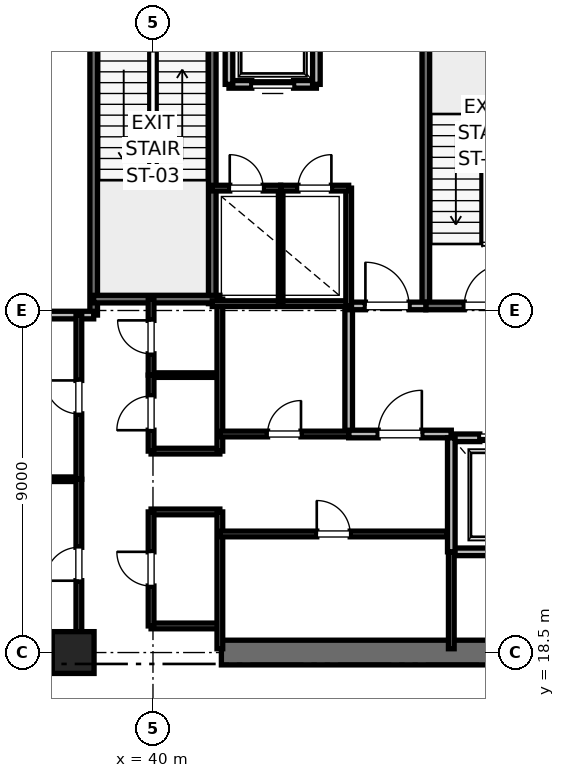
"""IFC4 building model, lengths in metres.
Left out: names, types, materials, properties, quantities, classifications, styles, units other than length and angle.
Written with IfcOpenShell. Run it as: python <this file> out.ifc"""

import sys

from ifc_helpers import new_model, si_unit, direction, frame, frame_2d, origin, origin_2d, place, context, subcontext, project, spatial, rectangle, extrude, element, fill, save


model = new_model("IFC4")
c1 = context("Model", 3, precision=1e-05, world=origin(), true_north=direction((0.0, 1.0)))
c2 = subcontext(c1, "Body", "Model", "MODEL_VIEW")
j1 = project(units=[si_unit("LENGTHUNIT", "METRE"), si_unit("PLANEANGLEUNIT", "RADIAN")], contexts=[c1])
p1 = place(None, origin())
s1 = spatial("IfcSite", under=j1, at=p1, CompositionType="ELEMENT")
p2 = place(p1, origin())
s2 = spatial("IfcBuilding", under=s1, at=p2, CompositionType="ELEMENT")
p3 = place(p2, frame((0.0, 0.0, -4.5)))
s3 = spatial("IfcBuildingStorey", under=s2, at=p3, CompositionType="ELEMENT", Elevation=-4.5)
p4 = place(p3, frame((37.9, 18.5, 0.0), z_axis=(0.0, 0.0, 1.0), x_axis=(1.0, 0.0, 0.0)))
e1 = element("IfcColumn", 1, at=p4, inside=s3, PredefinedType="PILASTER", context=c2, shape_type="SweptSolid", body=[
    extrude(rectangle(XDim=1.1, YDim=1.1, at=origin_2d()), origin(), (0.0, 0.0, 1.0), 4.5),
])
for number, where, z_axis, x_axis in (
    (2, (29.0, 18.5, 0.0), (0.0, 0.0, 1.0), (1.0, 0.0, 0.0)),
    (3, (41.8, 18.5, 0.0), (0.0, 0.0, 1.0), (1.0, 0.0, 0.0)),
):
    element("IfcWall", number, at=place(p3, frame(where, z_axis=z_axis, x_axis=x_axis)), inside=s3, PredefinedType="SHEAR", context=c2, shape_type="SweptSolid", body=[
        extrude(rectangle(XDim=9.2, YDim=0.65, at=frame_2d((4.6, 0.0))), origin(), (0.0, 0.0, 1.0), 4.22),
    ])
p5 = place(p3, frame((47.18, 27.62, 0.0), z_axis=(0.0, 0.0, 1.0), x_axis=(0.0, 1.0, 0.0)))
e4 = element("IfcWall", 4, at=p5, inside=s3, PredefinedType="SOLIDWALL", context=c2, shape_type="SweptSolid", body=[
    extrude(rectangle(XDim=8.18, YDim=0.2, at=frame_2d((4.09, 0.0))), origin(), (0.0, 0.0, 1.0), 4.22),
])
p6 = place(p3, frame((47.18, 27.62, 0.0), z_axis=(0.0, 0.0, 1.0), x_axis=(1.0, 0.0, 0.0)))
e5 = element("IfcWall", 5, at=p6, inside=s3, PredefinedType="SOLIDWALL", context=c2, shape_type="SweptSolid", body=[
    extrude(rectangle(XDim=3.12, YDim=0.2, at=frame_2d((1.56, 0.0))), origin(), (0.0, 0.0, 1.0), 4.22),
])
p7 = place(p6, frame((1.01, 0.0, 0.0)))
e6 = element("IfcOpeningElement", 6, at=p7, cuts=e5, PredefinedType="OPENING", context=c2, shape_type="SweptSolid", body=[
    extrude(rectangle(XDim=1.1, YDim=2.15, at=frame_2d((0.55, 1.075))), frame((0.0, 0.1, 0.0), z_axis=(0.0, -1.0, 0.0), x_axis=(1.0, 0.0, 0.0)), (0.0, 0.0, 1.0), 0.2),
])
p8 = place(p3, frame((38.44, 27.38, 0.0), z_axis=(0.0, 0.0, 1.0), x_axis=(0.0, 1.0, 0.0)))
e7 = element("IfcWall", 7, at=p8, inside=s3, PredefinedType="SOLIDWALL", context=c2, shape_type="SweptSolid", body=[
    extrude(rectangle(XDim=8.87, YDim=0.2, at=frame_2d((4.435, 0.0))), origin(), (0.0, 0.0, 1.0), 4.22),
])
p9 = place(p3, frame((41.56, 27.68, 0.0), z_axis=(0.0, 0.0, 1.0), x_axis=(0.0, 1.0, 0.0)))
e8 = element("IfcWall", 8, at=p9, inside=s3, PredefinedType="SOLIDWALL", context=c2, shape_type="SweptSolid", body=[
    extrude(rectangle(XDim=8.57, YDim=0.2, at=frame_2d((4.285, 0.0))), origin(), (0.0, 0.0, 1.0), 4.22),
])
p10 = place(p3, frame((38.44, 27.8, 0.0), z_axis=(0.0, 0.0, 1.0), x_axis=(1.0, 0.0, 0.0)))
e9 = element("IfcWall", 9, at=p10, inside=s3, PredefinedType="SOLIDWALL", context=c2, shape_type="SweptSolid", body=[
    extrude(rectangle(XDim=3.32, YDim=0.2, at=frame_2d((1.66, 0.0))), origin(), (0.0, 0.0, 1.0), 4.22),
])
p11 = place(p3, frame((32.82, 27.38, 0.0), z_axis=(0.0, 0.0, 1.0), x_axis=(1.0, 0.0, 0.0)))
e10 = element("IfcWall", 10, at=p11, inside=s3, PredefinedType="PARTITIONING", context=c2, shape_type="SweptSolid", body=[
    extrude(rectangle(XDim=5.62, YDim=0.2, at=frame_2d((2.81, 0.0))), origin(), (0.0, 0.0, 1.0), 4.22),
])
p12 = place(p3, frame((45.15, 24.25, 0.0), z_axis=(0.0, 0.0, 1.0), x_axis=(0.0, 1.0, 0.0)))
e11 = element("IfcWall", 11, at=p12, inside=s3, PredefinedType="PARTITIONING", context=c2, shape_type="SweptSolid", body=[
    extrude(rectangle(XDim=3.37, YDim=0.2, at=frame_2d((1.685, 0.0))), origin(), (0.0, 0.0, 1.0), 4.22),
])
p13 = place(p3, frame((45.15, 24.25, 0.0), z_axis=(0.0, 0.0, 1.0), x_axis=(1.0, 0.0, 0.0)))
e12 = element("IfcWall", 12, at=p13, inside=s3, PredefinedType="PARTITIONING", context=c2, shape_type="SweptSolid", body=[
    extrude(rectangle(XDim=2.7, YDim=0.2, at=frame_2d((1.35, 0.0))), origin(), (0.0, 0.0, 1.0), 4.22),
])
p14 = place(p13, frame((0.775, 0.0, 0.0)))
e13 = element("IfcOpeningElement", 13, at=p14, cuts=e12, PredefinedType="OPENING", context=c2, shape_type="SweptSolid", body=[
    extrude(rectangle(XDim=1.15, YDim=2.2, at=frame_2d((0.575, 1.1))), frame((0.0, 0.1, 0.0), z_axis=(0.0, -1.0, 0.0), x_axis=(1.0, 0.0, 0.0)), (0.0, 0.0, 1.0), 0.2),
])
p15 = place(p3, frame((45.15, 27.62, 0.0), z_axis=(0.0, 0.0, 1.0), x_axis=(1.0, 0.0, 0.0)))
e14 = element("IfcWall", 14, at=p15, inside=s3, PredefinedType="PARTITIONING", context=c2, shape_type="SweptSolid", body=[
    extrude(rectangle(XDim=2.03, YDim=0.2, at=frame_2d((1.015, 0.0))), origin(), (0.0, 0.0, 1.0), 4.22),
])
p16 = place(p15, frame((0.44, 0.0, 0.0)))
e15 = element("IfcOpeningElement", 15, at=p16, cuts=e14, PredefinedType="OPENING", context=c2, shape_type="SweptSolid", body=[
    extrude(rectangle(XDim=1.15, YDim=2.2, at=frame_2d((0.575, 1.1))), frame((0.0, 0.1, 0.0), z_axis=(0.0, -1.0, 0.0), x_axis=(1.0, 0.0, 0.0)), (0.0, 0.0, 1.0), 0.2),
])
p17 = place(p3, frame((47.85, 21.15, 0.0), z_axis=(0.0, 0.0, 1.0), x_axis=(1.0, 0.0, 0.0)))
e16 = element("IfcWall", 16, at=p17, inside=s3, PredefinedType="SOLIDWALL", context=c2, shape_type="SweptSolid", body=[
    extrude(rectangle(XDim=2.6, YDim=0.2, at=frame_2d((1.3, 0.0))), origin(), (0.0, 0.0, 1.0), 4.22),
])
p18 = place(p3, frame((50.45, 24.15, 0.0), z_axis=(0.0, 0.0, 1.0), x_axis=(-1.0, 0.0, 0.0)))
e17 = element("IfcWall", 17, at=p18, inside=s3, PredefinedType="SOLIDWALL", context=c2, shape_type="SweptSolid", body=[
    extrude(rectangle(XDim=2.6, YDim=0.2, at=frame_2d((1.3, 0.0))), origin(), (0.0, 0.0, 1.0), 3.0),
])
p19 = place(p18, frame((0.75, 0.0, 0.0)))
e18 = element("IfcOpeningElement", 18, at=p19, cuts=e17, PredefinedType="OPENING", context=c2, shape_type="SweptSolid", body=[
    extrude(rectangle(XDim=1.1, YDim=2.2, at=frame_2d((0.55, 1.1))), frame((0.0, 0.1, 0.0), z_axis=(0.0, -1.0, 0.0), x_axis=(1.0, 0.0, 0.0)), (0.0, 0.0, 1.0), 0.2),
])
p20 = place(p3, frame((47.85, 24.15, 0.0), z_axis=(0.0, 0.0, 1.0), x_axis=(0.0, -1.0, 0.0)))
e19 = element("IfcWall", 19, at=p20, inside=s3, PredefinedType="SOLIDWALL", context=c2, shape_type="SweptSolid", body=[
    extrude(rectangle(XDim=3.0, YDim=0.2, at=frame_2d((1.5, 0.0))), origin(), (0.0, 0.0, 1.0), 4.22),
])
p21 = place(p3, frame((42.0, 33.45, 0.0), z_axis=(0.0, 0.0, 1.0), x_axis=(1.0, 0.0, 0.0)))
e20 = element("IfcWall", 20, at=p21, inside=s3, PredefinedType="SOLIDWALL", context=c2, shape_type="SweptSolid", body=[
    extrude(rectangle(XDim=2.3, YDim=0.2, at=frame_2d((1.15, 0.0))), origin(), (0.0, 0.0, 1.0), 4.22),
])
p22 = place(p21, frame((0.6, 0.0, 0.0)))
e21 = element("IfcOpeningElement", 21, at=p22, cuts=e20, PredefinedType="OPENING", context=c2, shape_type="SweptSolid", body=[
    extrude(rectangle(XDim=1.1, YDim=2.2, at=frame_2d((0.55, 1.1))), frame((0.0, 0.1, 0.0), z_axis=(0.0, -1.0, 0.0), x_axis=(1.0, 0.0, 0.0)), (0.0, 0.0, 1.0), 0.2),
])
for number, where, z_axis, x_axis in (
    (22, (42.0, 36.05, 0.0), (0.0, 0.0, 1.0), (0.0, -1.0, 0.0)),
    (23, (44.3, 33.45, 0.0), (0.0, 0.0, 1.0), (0.0, 1.0, 0.0)),
):
    element("IfcWall", number, at=place(p3, frame(where, z_axis=z_axis, x_axis=x_axis)), inside=s3, PredefinedType="SOLIDWALL", context=c2, shape_type="SweptSolid", body=[
        extrude(rectangle(XDim=2.6, YDim=0.2, at=frame_2d((1.3, 0.0))), origin(), (0.0, 0.0, 1.0), 3.0),
    ])
for number, where, z_axis, x_axis in (
    (24, (39.95, 19.2, 0.0), (0.0, 0.0, 1.0), (1.0, 0.0, 0.0)),
    (25, (39.95, 22.2, 0.0), (0.0, 0.0, 1.0), (1.0, 0.0, 0.0)),
    (26, (39.95, 23.8, 0.0), (0.0, 0.0, 1.0), (1.0, 0.0, 0.0)),
):
    element("IfcWall", number, at=place(p3, frame(where, z_axis=z_axis, x_axis=x_axis)), inside=s3, PredefinedType="PARTITIONING", context=c2, shape_type="SweptSolid", body=[
        extrude(rectangle(XDim=1.81, YDim=0.15, at=frame_2d((0.905, 0.0))), origin(), (0.0, 0.0, 1.0), 2.85),
    ])
p23 = place(p3, frame((39.95, 25.8, 0.0), z_axis=(0.0, 0.0, 1.0), x_axis=(1.0, 0.0, 0.0)))
e27 = element("IfcWall", 27, at=p23, inside=s3, PredefinedType="PARTITIONING", context=c2, shape_type="SweptSolid", body=[
    extrude(rectangle(XDim=1.81, YDim=0.12, at=frame_2d((0.905, 0.0))), origin(), (0.0, 0.0, 1.0), 2.85),
])
p24 = place(p3, frame((41.76, 18.6, 0.0), z_axis=(0.0, 0.0, 1.0), x_axis=(0.0, 1.0, 0.0)))
e28 = element("IfcWall", 28, at=p24, inside=s3, PredefinedType="PARTITIONING", context=c2, shape_type="SweptSolid", body=[
    extrude(rectangle(XDim=3.6, YDim=0.15, at=frame_2d((1.8, 0.0))), origin(), (0.0, 0.0, 1.0), 2.85),
])
p25 = place(p3, frame((41.76, 23.8, 0.0), z_axis=(0.0, 0.0, 1.0), x_axis=(0.0, 1.0, 0.0)))
e29 = element("IfcWall", 29, at=p25, inside=s3, PredefinedType="PARTITIONING", context=c2, shape_type="SweptSolid", body=[
    extrude(rectangle(XDim=4.0, YDim=0.15, at=frame_2d((2.0, 0.0))), origin(), (0.0, 0.0, 1.0), 2.85),
])
p26 = place(p3, frame((39.95, 19.2, 0.0), z_axis=(0.0, 0.0, 1.0), x_axis=(0.0, 1.0, 0.0)))
e30 = element("IfcWall", 30, at=p26, inside=s3, PredefinedType="PARTITIONING", context=c2, shape_type="SweptSolid", body=[
    extrude(rectangle(XDim=3.0, YDim=0.15, at=frame_2d((1.5, 0.0))), origin(), (0.0, 0.0, 1.0), 2.85),
])
p27 = place(p26, frame((1.05, 0.0, 0.0)))
e31 = element("IfcOpeningElement", 31, at=p27, cuts=e30, PredefinedType="OPENING", context=c2, shape_type="SweptSolid", body=[
    extrude(rectangle(XDim=0.9, YDim=2.1, at=frame_2d((0.45, 1.05))), frame((0.0, 0.075, 0.0), z_axis=(0.0, -1.0, 0.0), x_axis=(1.0, 0.0, 0.0)), (0.0, 0.0, 1.0), 0.15),
])
p28 = place(p3, frame((39.95, 23.8, 0.0), z_axis=(0.0, 0.0, 1.0), x_axis=(0.0, 1.0, 0.0)))
e32 = element("IfcWall", 32, at=p28, inside=s3, PredefinedType="PARTITIONING", context=c2, shape_type="SweptSolid", body=[
    extrude(rectangle(XDim=2.0, YDim=0.15, at=frame_2d((1.0, 0.0))), origin(), (0.0, 0.0, 1.0), 2.85),
])
p29 = place(p28, frame((0.55, 0.0, 0.0)))
e33 = element("IfcOpeningElement", 33, at=p29, cuts=e32, PredefinedType="OPENING", context=c2, shape_type="SweptSolid", body=[
    extrude(rectangle(XDim=0.9, YDim=2.1, at=frame_2d((0.45, 1.05))), frame((0.0, 0.075, 0.0), z_axis=(0.0, -1.0, 0.0), x_axis=(1.0, 0.0, 0.0)), (0.0, 0.0, 1.0), 0.15),
])
p30 = place(p3, frame((39.95, 25.8, 0.0), z_axis=(0.0, 0.0, 1.0), x_axis=(0.0, 1.0, 0.0)))
e34 = element("IfcWall", 34, at=p30, inside=s3, PredefinedType="PARTITIONING", context=c2, shape_type="SweptSolid", body=[
    extrude(rectangle(XDim=2.0, YDim=0.15, at=frame_2d((1.0, 0.0))), origin(), (0.0, 0.0, 1.0), 2.85),
])
p31 = place(p30, frame((0.56, 0.0, 0.0)))
e35 = element("IfcOpeningElement", 35, at=p31, cuts=e34, PredefinedType="OPENING", context=c2, shape_type="SweptSolid", body=[
    extrude(rectangle(XDim=0.88, YDim=2.1, at=frame_2d((0.44, 1.05))), frame((0.0, 0.075, 0.0), z_axis=(0.0, -1.0, 0.0), x_axis=(1.0, 0.0, 0.0)), (0.0, 0.0, 1.0), 0.15),
])
p32 = place(p3, frame((32.82, 23.06, 0.0), z_axis=(0.0, 0.0, 1.0), x_axis=(1.0, 0.0, 0.0)))
e36 = element("IfcWall", 36, at=p32, inside=s3, PredefinedType="PARTITIONING", context=c2, shape_type="SweptSolid", body=[
    extrude(rectangle(XDim=5.23, YDim=0.12, at=frame_2d((2.615, 0.0))), origin(), (0.0, 0.0, 1.0), 2.85),
])
p33 = place(p3, frame((38.05, 18.6, 0.0), z_axis=(0.0, 0.0, 1.0), x_axis=(0.0, 1.0, 0.0)))
e37 = element("IfcWall", 37, at=p33, inside=s3, PredefinedType="PARTITIONING", context=c2, shape_type="SweptSolid", body=[
    extrude(rectangle(XDim=4.46, YDim=0.15, at=frame_2d((2.23, 0.0))), origin(), (0.0, 0.0, 1.0), 2.85),
])
p34 = place(p33, frame((1.79, 0.0, 0.0)))
e38 = element("IfcOpeningElement", 38, at=p34, cuts=e37, PredefinedType="OPENING", context=c2, shape_type="SweptSolid", body=[
    extrude(rectangle(XDim=0.88, YDim=2.1, at=frame_2d((0.44, 1.05))), frame((0.0, 0.075, 0.0), z_axis=(0.0, -1.0, 0.0), x_axis=(1.0, 0.0, 0.0)), (0.0, 0.0, 1.0), 0.15),
])
p35 = place(p3, frame((38.05, 23.06, 0.0), z_axis=(0.0, 0.0, 1.0), x_axis=(0.0, 1.0, 0.0)))
e39 = element("IfcWall", 39, at=p35, inside=s3, PredefinedType="PARTITIONING", context=c2, shape_type="SweptSolid", body=[
    extrude(rectangle(XDim=4.32, YDim=0.15, at=frame_2d((2.16, 0.0))), origin(), (0.0, 0.0, 1.0), 2.85),
])
p36 = place(p35, frame((1.72, 0.0, 0.0)))
e40 = element("IfcOpeningElement", 40, at=p36, cuts=e39, PredefinedType="OPENING", context=c2, shape_type="SweptSolid", body=[
    extrude(rectangle(XDim=0.88, YDim=2.1, at=frame_2d((0.44, 1.05))), frame((0.0, 0.075, 0.0), z_axis=(0.0, -1.0, 0.0), x_axis=(1.0, 0.0, 0.0)), (0.0, 0.0, 1.0), 0.15),
])
p37 = place(p3, frame((41.56, 27.68, 0.0), z_axis=(0.0, 0.0, 1.0), x_axis=(1.0, 0.0, 0.0)))
e41 = element("IfcWall", 41, at=p37, inside=s3, PredefinedType="PARTITIONING", context=c2, shape_type="SweptSolid", body=[
    extrude(rectangle(XDim=3.59, YDim=0.15, at=frame_2d((1.795, 0.0))), origin(), (0.0, 0.0, 1.0), 2.85),
])
p38 = place(p3, frame((47.85, 18.6, 0.0), z_axis=(0.0, 0.0, 1.0), x_axis=(0.0, 1.0, 0.0)))
e42 = element("IfcWall", 42, at=p38, inside=s3, PredefinedType="PARTITIONING", context=c2, shape_type="SweptSolid", body=[
    extrude(rectangle(XDim=2.54, YDim=0.15, at=frame_2d((1.27, 0.0))), origin(), (0.0, 0.0, 1.0), 2.85),
])
p39 = place(p3, frame((41.76, 21.62, 0.0), z_axis=(0.0, 0.0, 1.0), x_axis=(1.0, 0.0, 0.0)))
e43 = element("IfcWall", 43, at=p39, inside=s3, PredefinedType="PARTITIONING", context=c2, shape_type="SweptSolid", body=[
    extrude(rectangle(XDim=5.98, YDim=0.15, at=frame_2d((2.99, 0.0))), origin(), (0.0, 0.0, 1.0), 2.85),
])
p40 = place(p39, frame((2.55, 0.0, 0.0)))
e44 = element("IfcOpeningElement", 44, at=p40, cuts=e43, PredefinedType="OPENING", context=c2, shape_type="SweptSolid", body=[
    extrude(rectangle(XDim=0.88, YDim=2.1, at=frame_2d((0.44, 1.05))), frame((0.0, 0.075, 0.0), z_axis=(0.0, -1.0, 0.0), x_axis=(1.0, 0.0, 0.0)), (0.0, 0.0, 1.0), 0.15),
])
p41 = place(p3, frame((41.76, 24.25, 0.0), z_axis=(0.0, 0.0, 1.0), x_axis=(1.0, 0.0, 0.0)))
e45 = element("IfcWall", 45, at=p41, inside=s3, PredefinedType="PARTITIONING", context=c2, shape_type="SweptSolid", body=[
    extrude(rectangle(XDim=3.39, YDim=0.15, at=frame_2d((1.695, 0.0))), origin(), (0.0, 0.0, 1.0), 2.85),
])
p42 = place(p41, frame((1.255, 0.0, 0.0)))
e46 = element("IfcOpeningElement", 46, at=p42, cuts=e45, PredefinedType="OPENING", context=c2, shape_type="SweptSolid", body=[
    extrude(rectangle(XDim=0.88, YDim=2.1, at=frame_2d((0.44, 1.05))), frame((0.0, 0.075, 0.0), z_axis=(0.0, -1.0, 0.0), x_axis=(1.0, 0.0, 0.0)), (0.0, 0.0, 1.0), 0.15),
])
p43 = place(p3, frame((45.15, 27.62, 0.0), z_axis=(0.0, 0.0, 1.0), x_axis=(0.0, 1.0, 0.0)))
e47 = element("IfcWall", 47, at=p43, inside=s3, PredefinedType="PARTITIONING", context=c2, shape_type="SweptSolid", body=[
    extrude(rectangle(XDim=3.1, YDim=0.15, at=frame_2d((1.55, 0.0))), origin(), (0.0, 0.0, 1.0), 2.85),
])
p44 = place(p3, frame((43.36, 27.68, 0.0), z_axis=(0.0, 0.0, 1.0), x_axis=(0.0, 1.0, 0.0)))
e48 = element("IfcWall", 48, at=p44, inside=s3, PredefinedType="PARTITIONING", context=c2, shape_type="SweptSolid", body=[
    extrude(rectangle(XDim=3.04, YDim=0.12, at=frame_2d((1.52, 0.0))), origin(), (0.0, 0.0, 1.0), 2.85),
])
p45 = place(p3, frame((41.56, 30.72, 0.0), z_axis=(0.0, 0.0, 1.0), x_axis=(1.0, 0.0, 0.0)))
e49 = element("IfcWall", 49, at=p45, inside=s3, PredefinedType="PARTITIONING", context=c2, shape_type="SweptSolid", body=[
    extrude(rectangle(XDim=1.8, YDim=0.15, at=frame_2d((0.9, 0.0))), origin(), (0.0, 0.0, 1.0), 2.85),
])
p46 = place(p45, frame((0.46, 0.0, 0.0)))
e50 = element("IfcOpeningElement", 50, at=p46, cuts=e49, PredefinedType="OPENING", context=c2, shape_type="SweptSolid", body=[
    extrude(rectangle(XDim=0.88, YDim=2.1, at=frame_2d((0.44, 1.05))), frame((0.0, 0.075, 0.0), z_axis=(0.0, -1.0, 0.0), x_axis=(1.0, 0.0, 0.0)), (0.0, 0.0, 1.0), 0.15),
])
p47 = place(p3, frame((43.36, 30.72, 0.0), z_axis=(0.0, 0.0, 1.0), x_axis=(1.0, 0.0, 0.0)))
e51 = element("IfcWall", 51, at=p47, inside=s3, PredefinedType="PARTITIONING", context=c2, shape_type="SweptSolid", body=[
    extrude(rectangle(XDim=1.79, YDim=0.15, at=frame_2d((0.895, 0.0))), origin(), (0.0, 0.0, 1.0), 2.85),
])
p48 = place(p47, frame((0.455, 0.0, 0.0)))
e52 = element("IfcOpeningElement", 52, at=p48, cuts=e51, PredefinedType="OPENING", context=c2, shape_type="SweptSolid", body=[
    extrude(rectangle(XDim=0.88, YDim=2.1, at=frame_2d((0.44, 1.05))), frame((0.0, 0.075, 0.0), z_axis=(0.0, -1.0, 0.0), x_axis=(1.0, 0.0, 0.0)), (0.0, 0.0, 1.0), 0.15),
])
p49 = place(p7, origin())
e53 = element("IfcDoor", 53, at=p49, inside=s3, OperationType="SINGLE_SWING_RIGHT", PredefinedType="DOOR", context=c2, shape_type="SweptSolid", body=[
    extrude(rectangle(XDim=1.1, YDim=2.15, at=frame_2d((0.55, 1.075))), frame((0.0, 0.025, 0.0), z_axis=(0.0, -1.0, 0.0), x_axis=(1.0, 0.0, 0.0)), (0.0, 0.0, 1.0), 0.05),
])
fill(e6, e53)
p50 = place(p14, origin())
e54 = element("IfcDoor", 54, at=p50, inside=s3, OperationType="SINGLE_SWING_RIGHT", PredefinedType="DOOR", context=c2, shape_type="SweptSolid", body=[
    extrude(rectangle(XDim=1.15, YDim=2.2, at=frame_2d((0.575, 1.1))), frame((0.0, 0.025, 0.0), z_axis=(0.0, -1.0, 0.0), x_axis=(1.0, 0.0, 0.0)), (0.0, 0.0, 1.0), 0.05),
])
fill(e13, e54)
p51 = place(p16, origin())
e55 = element("IfcDoor", 55, at=p51, inside=s3, OperationType="SINGLE_SWING_LEFT", PredefinedType="DOOR", context=c2, shape_type="SweptSolid", body=[
    extrude(rectangle(XDim=1.15, YDim=2.2, at=frame_2d((0.575, 1.1))), frame((0.0, 0.025, 0.0), z_axis=(0.0, -1.0, 0.0), x_axis=(1.0, 0.0, 0.0)), (0.0, 0.0, 1.0), 0.05),
])
fill(e15, e55)
p52 = place(p19, origin())
e56 = element("IfcDoor", 56, at=p52, inside=s3, OperationType="SLIDING_TO_RIGHT", PredefinedType="DOOR", context=c2, shape_type="SweptSolid", body=[
    extrude(rectangle(XDim=1.1, YDim=2.2, at=frame_2d((0.55, 1.1))), frame((0.0, 0.025, 0.0), z_axis=(0.0, -1.0, 0.0), x_axis=(1.0, 0.0, 0.0)), (0.0, 0.0, 1.0), 0.05),
])
fill(e18, e56)
p53 = place(p22, origin())
e57 = element("IfcDoor", 57, at=p53, inside=s3, OperationType="SLIDING_TO_RIGHT", PredefinedType="DOOR", context=c2, shape_type="SweptSolid", body=[
    extrude(rectangle(XDim=1.1, YDim=2.2, at=frame_2d((0.55, 1.1))), frame((0.0, 0.025, 0.0), z_axis=(0.0, -1.0, 0.0), x_axis=(1.0, 0.0, 0.0)), (0.0, 0.0, 1.0), 0.05),
])
fill(e21, e57)
p54 = place(p27, origin())
e58 = element("IfcDoor", 58, at=p54, inside=s3, OperationType="SINGLE_SWING_RIGHT", PredefinedType="DOOR", context=c2, shape_type="SweptSolid", body=[
    extrude(rectangle(XDim=0.9, YDim=2.1, at=frame_2d((0.45, 1.05))), frame((0.0, 0.025, 0.0), z_axis=(0.0, -1.0, 0.0), x_axis=(1.0, 0.0, 0.0)), (0.0, 0.0, 1.0), 0.05),
])
fill(e31, e58)
p55 = place(p29, origin())
e59 = element("IfcDoor", 59, at=p55, inside=s3, OperationType="SINGLE_SWING_LEFT", PredefinedType="DOOR", context=c2, shape_type="SweptSolid", body=[
    extrude(rectangle(XDim=0.9, YDim=2.1, at=frame_2d((0.45, 1.05))), frame((0.0, 0.025, 0.0), z_axis=(0.0, -1.0, 0.0), x_axis=(1.0, 0.0, 0.0)), (0.0, 0.0, 1.0), 0.05),
])
fill(e33, e59)
p56 = place(p31, origin())
e60 = element("IfcDoor", 60, at=p56, inside=s3, OperationType="SINGLE_SWING_RIGHT", PredefinedType="DOOR", context=c2, shape_type="SweptSolid", body=[
    extrude(rectangle(XDim=0.88, YDim=2.1, at=frame_2d((0.44, 1.05))), frame((0.0, 0.025, 0.0), z_axis=(0.0, -1.0, 0.0), x_axis=(1.0, 0.0, 0.0)), (0.0, 0.0, 1.0), 0.05),
])
fill(e35, e60)
p57 = place(p34, origin())
e61 = element("IfcDoor", 61, at=p57, inside=s3, OperationType="SINGLE_SWING_LEFT", PredefinedType="DOOR", context=c2, shape_type="SweptSolid", body=[
    extrude(rectangle(XDim=0.88, YDim=2.1, at=frame_2d((0.44, 1.05))), frame((0.0, 0.025, 0.0), z_axis=(0.0, -1.0, 0.0), x_axis=(1.0, 0.0, 0.0)), (0.0, 0.0, 1.0), 0.05),
])
fill(e38, e61)
p58 = place(p36, origin())
e62 = element("IfcDoor", 62, at=p58, inside=s3, OperationType="SINGLE_SWING_RIGHT", PredefinedType="DOOR", context=c2, shape_type="SweptSolid", body=[
    extrude(rectangle(XDim=0.88, YDim=2.1, at=frame_2d((0.44, 1.05))), frame((0.0, 0.025, 0.0), z_axis=(0.0, -1.0, 0.0), x_axis=(1.0, 0.0, 0.0)), (0.0, 0.0, 1.0), 0.05),
])
fill(e40, e62)
p59 = place(p40, origin())
e63 = element("IfcDoor", 63, at=p59, inside=s3, OperationType="SINGLE_SWING_LEFT", PredefinedType="DOOR", context=c2, shape_type="SweptSolid", body=[
    extrude(rectangle(XDim=0.88, YDim=2.1, at=frame_2d((0.44, 1.05))), frame((0.0, 0.025, 0.0), z_axis=(0.0, -1.0, 0.0), x_axis=(1.0, 0.0, 0.0)), (0.0, 0.0, 1.0), 0.05),
])
fill(e44, e63)
p60 = place(p42, origin())
e64 = element("IfcDoor", 64, at=p60, inside=s3, OperationType="SINGLE_SWING_RIGHT", PredefinedType="DOOR", context=c2, shape_type="SweptSolid", body=[
    extrude(rectangle(XDim=0.88, YDim=2.1, at=frame_2d((0.44, 1.05))), frame((0.0, 0.025, 0.0), z_axis=(0.0, -1.0, 0.0), x_axis=(1.0, 0.0, 0.0)), (0.0, 0.0, 1.0), 0.05),
])
fill(e46, e64)
p61 = place(p46, origin())
e65 = element("IfcDoor", 65, at=p61, inside=s3, OperationType="SINGLE_SWING_LEFT", PredefinedType="DOOR", context=c2, shape_type="SweptSolid", body=[
    extrude(rectangle(XDim=0.88, YDim=2.1, at=frame_2d((0.44, 1.05))), frame((0.0, 0.025, 0.0), z_axis=(0.0, -1.0, 0.0), x_axis=(1.0, 0.0, 0.0)), (0.0, 0.0, 1.0), 0.05),
])
fill(e50, e65)
p62 = place(p48, origin())
e66 = element("IfcDoor", 66, at=p62, inside=s3, OperationType="SINGLE_SWING_RIGHT", PredefinedType="DOOR", context=c2, shape_type="SweptSolid", body=[
    extrude(rectangle(XDim=0.88, YDim=2.1, at=frame_2d((0.44, 1.05))), frame((0.0, 0.025, 0.0), z_axis=(0.0, -1.0, 0.0), x_axis=(1.0, 0.0, 0.0)), (0.0, 0.0, 1.0), 0.05),
])
fill(e52, e66)
save(model, sys.argv[1])
